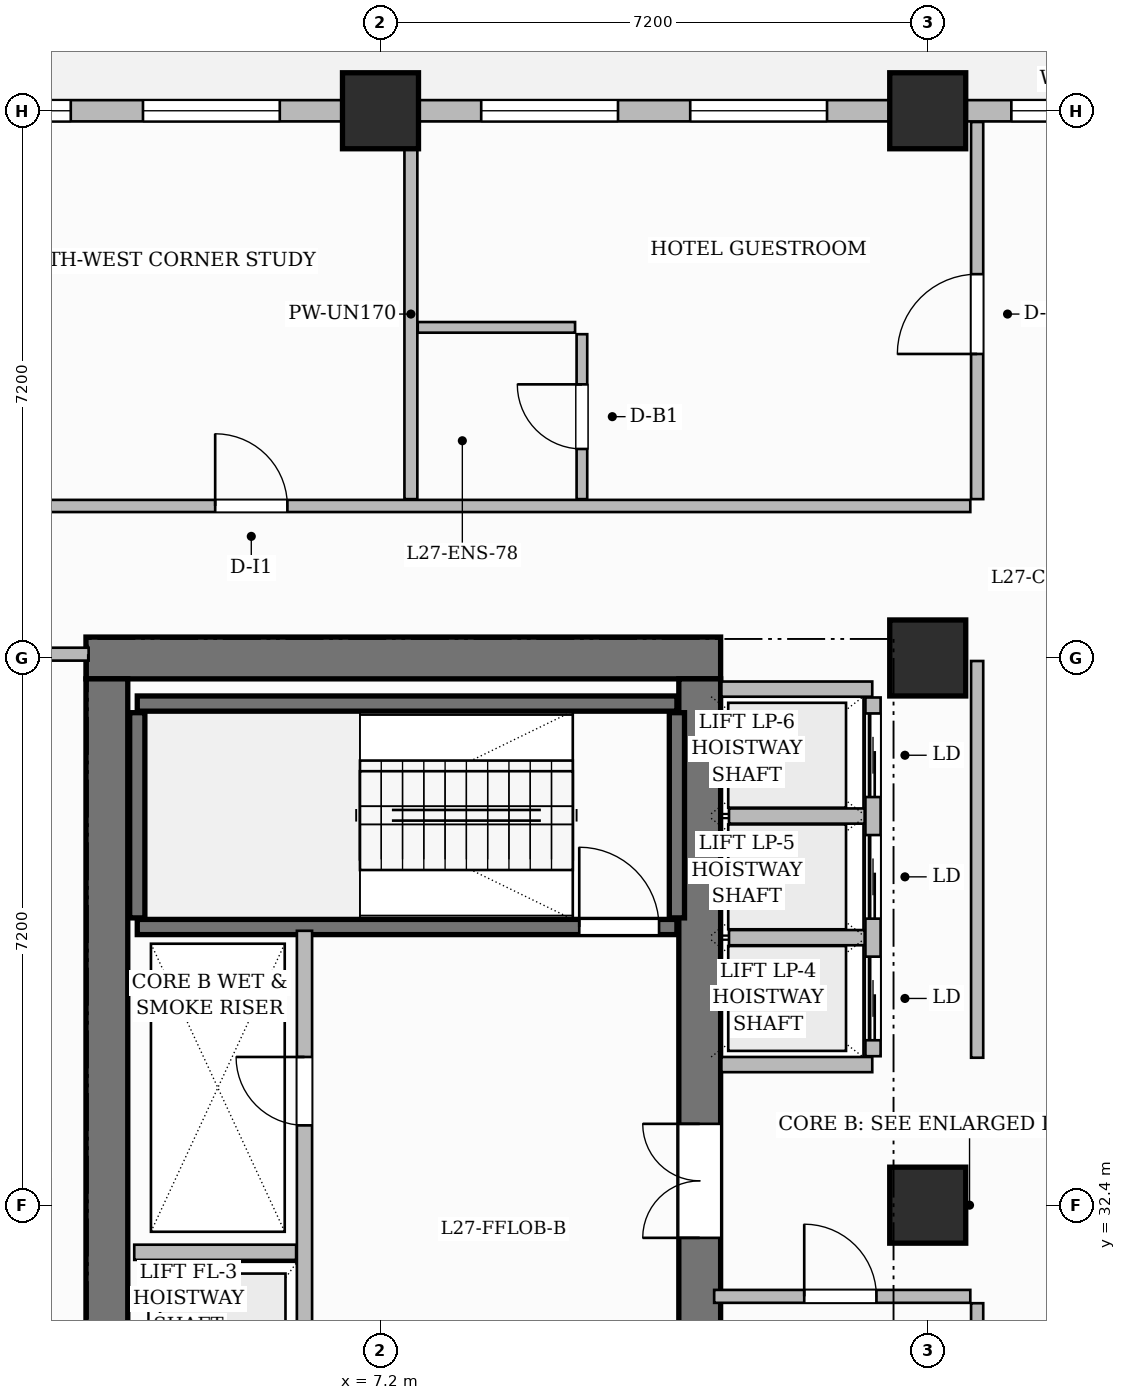
"""IFC4 building model, lengths in metres.
Left out: names, types, materials, properties, quantities, classifications, styles, units other than length and angle.
Written with IfcOpenShell. Run it as: python <this file> out.ifc"""

import sys

from ifc_helpers import new_model, si_unit, direction, frame, frame_2d, origin, origin_2d, place, context, subcontext, project, spatial, rectangle, extrude, source, transform, mapped, element, fill, save


model = new_model("IFC4")
c1 = context("Model", 3, precision=1e-05, world=origin(), true_north=direction((0.0, 1.0)))
c2 = subcontext(c1, "Body", "Model", "MODEL_VIEW")
j1 = project(units=[si_unit("LENGTHUNIT", "METRE"), si_unit("PLANEANGLEUNIT", "RADIAN")], contexts=[c1])
p1 = place(None, origin())
s1 = spatial("IfcSite", under=j1, at=p1, CompositionType="ELEMENT")
p2 = place(p1, origin())
s2 = spatial("IfcBuilding", under=s1, at=p2, CompositionType="ELEMENT")
p3 = place(p2, frame((0.0, 0.0, 111.8)))
s3 = spatial("IfcBuildingStorey", under=s2, at=p3, CompositionType="ELEMENT", Elevation=111.8)
p4 = place(p3, frame((3.325, 39.6, 0.0), z_axis=(0.0, 0.0, 1.0), x_axis=(1.0, 0.0, 0.0)))
e1 = element("IfcWall", 1, at=p4, inside=s3, PredefinedType="SHEAR", context=c2, shape_type="SweptSolid", body=[
    extrude(rectangle(XDim=8.35, YDim=0.55, at=frame_2d((4.175, 0.0))), origin(), (0.0, 0.0, 1.0), 3.7),
])
p5 = place(p3, frame((3.6, 25.475, 0.0), z_axis=(0.0, 0.0, 1.0), x_axis=(0.0, 1.0, 0.0)))
e2 = element("IfcWall", 2, at=p5, inside=s3, PredefinedType="SHEAR", context=c2, shape_type="SweptSolid", body=[
    extrude(rectangle(XDim=13.85, YDim=0.55, at=frame_2d((6.925, 0.0))), origin(), (0.0, 0.0, 1.0), 3.7),
])
p6 = place(p3, frame((11.4, 25.475, 0.0), z_axis=(0.0, 0.0, 1.0), x_axis=(0.0, 1.0, 0.0)))
e3 = element("IfcWall", 3, at=p6, inside=s3, PredefinedType="SHEAR", context=c2, shape_type="SweptSolid", body=[
    extrude(rectangle(XDim=13.85, YDim=0.55, at=frame_2d((6.925, 0.0))), origin(), (0.0, 0.0, 1.0), 3.7),
])
p7 = place(p6, frame((6.495, 0.0, 0.0)))
e4 = element("IfcOpeningElement", 4, at=p7, cuts=e3, PredefinedType="OPENING", context=c2, shape_type="SweptSolid", body=[
    extrude(rectangle(XDim=1.5, YDim=2.2, at=frame_2d((0.75, 1.1))), frame((0.0, 0.285, 0.0), z_axis=(0.0, -1.0, 0.0), x_axis=(1.0, 0.0, 0.0)), (0.0, 0.0, 1.0), 0.57),
])
m1 = source(origin(), c2, "Body", "SweptSolid", [
    extrude(rectangle(XDim=1.0, YDim=1.0, at=origin_2d()), origin(), (0.0, 0.0, 1.0), 3.7),
])
for number, where, z_axis, x_axis in (
    (5, (7.2, 46.8, 0.0), (0.0, 0.0, 1.0), (1.0, 0.0, 0.0)),
    (6, (14.4, 32.4, 0.0), (0.0, 0.0, 1.0), (1.0, 0.0, 0.0)),
    (7, (14.4, 39.6, 0.0), (0.0, 0.0, 1.0), (1.0, 0.0, 0.0)),
    (8, (14.4, 46.8, 0.0), (0.0, 0.0, 1.0), (1.0, 0.0, 0.0)),
):
    element("IfcColumn", number, at=place(p3, frame(where, z_axis=z_axis, x_axis=x_axis)), inside=s3, PredefinedType="COLUMN", context=c2, shape_type="MappedRepresentation", body=[
        mapped(m1, transform((0.0, 0.0, 0.0), scale=1.0)),
    ])
p8 = place(p3, frame((4.0, 39.0, 0.0), z_axis=(0.0, 0.0, 1.0), x_axis=(1.0, 0.0, 0.0)))
e9 = element("IfcWall", 9, at=p8, inside=s3, PredefinedType="SHEAR", context=c2, shape_type="SweptSolid", body=[
    extrude(rectangle(XDim=7.1, YDim=0.2, at=frame_2d((3.55, 0.0))), origin(), (0.0, 0.0, 1.0), 3.7),
])
for number, where, z_axis, x_axis in (
    (10, (4.0, 36.18, 0.0), (0.0, 0.0, 1.0), (0.0, 1.0, 0.0)),
    (11, (11.1, 36.18, 0.0), (0.0, 0.0, 1.0), (0.0, 1.0, 0.0)),
):
    element("IfcWall", number, at=place(p3, frame(where, z_axis=z_axis, x_axis=x_axis)), inside=s3, PredefinedType="SHEAR", context=c2, shape_type="SweptSolid", body=[
        extrude(rectangle(XDim=2.7, YDim=0.2, at=frame_2d((1.35, 0.0))), origin(), (0.0, 0.0, 1.0), 3.7),
    ])
p9 = place(p3, frame((4.0, 36.06, 0.0), z_axis=(0.0, 0.0, 1.0), x_axis=(1.0, 0.0, 0.0)))
e12 = element("IfcWall", 12, at=p9, inside=s3, PredefinedType="SHEAR", context=c2, shape_type="SweptSolid", body=[
    extrude(rectangle(XDim=7.1, YDim=0.2, at=frame_2d((3.55, 0.0))), origin(), (0.0, 0.0, 1.0), 3.7),
])
p10 = place(p9, frame((5.815, 0.0, 0.0)))
e13 = element("IfcOpeningElement", 13, at=p10, cuts=e12, PredefinedType="OPENING", context=c2, shape_type="SweptSolid", body=[
    extrude(rectangle(XDim=1.05, YDim=2.2, at=frame_2d((0.525, 1.1))), frame((0.0, 0.11, 0.0), z_axis=(0.0, -1.0, 0.0), x_axis=(1.0, 0.0, 0.0)), (0.0, 0.0, 1.0), 0.22),
])
p11 = place(p3, frame((6.2, 28.79, 0.0), z_axis=(0.0, 0.0, 1.0), x_axis=(0.0, 1.0, 0.0)))
e14 = element("IfcWall", 14, at=p11, inside=s3, PredefinedType="PARTITIONING", context=c2, shape_type="SweptSolid", body=[
    extrude(rectangle(XDim=7.22, YDim=0.2, at=frame_2d((3.61, 0.0))), origin(), (0.0, 0.0, 1.0), 3.45),
])
p12 = place(p11, frame((4.66, 0.0, 0.0)))
e15 = element("IfcOpeningElement", 15, at=p12, cuts=e14, PredefinedType="OPENING", context=c2, shape_type="SweptSolid", body=[
    extrude(rectangle(XDim=0.9, YDim=2.1, at=frame_2d((0.45, 1.05))), frame((0.0, 0.11, 0.0), z_axis=(0.0, -1.0, 0.0), x_axis=(1.0, 0.0, 0.0)), (0.0, 0.0, 1.0), 0.22),
])
p13 = place(p11, frame((0.96, 0.0, 0.0)))
e16 = element("IfcOpeningElement", 16, at=p13, cuts=e14, PredefinedType="OPENING", context=c2, shape_type="SweptSolid", body=[
    extrude(rectangle(XDim=1.1, YDim=2.2, at=frame_2d((0.55, 1.1))), frame((0.0, 0.11, 0.0), z_axis=(0.0, -1.0, 0.0), x_axis=(1.0, 0.0, 0.0)), (0.0, 0.0, 1.0), 0.22),
])
p14 = place(p3, frame((3.96, 31.78, 0.0), z_axis=(0.0, 0.0, 1.0), x_axis=(1.0, 0.0, 0.0)))
e17 = element("IfcWall", 17, at=p14, inside=s3, PredefinedType="PARTITIONING", context=c2, shape_type="SweptSolid", body=[
    extrude(rectangle(XDim=2.13, YDim=0.2, at=frame_2d((1.065, 0.0))), origin(), (0.0, 0.0, 1.0), 3.45),
])
for number, where, z_axis, x_axis in (
    (18, (11.685, 34.25, 0.0), (0.0, 0.0, 1.0), (1.0, 0.0, 0.0)),
    (19, (11.685, 39.19, 0.0), (0.0, 0.0, 1.0), (1.0, 0.0, 0.0)),
):
    element("IfcWall", number, at=place(p3, frame(where, z_axis=z_axis, x_axis=x_axis)), inside=s3, PredefinedType="PARTITIONING", context=c2, shape_type="SweptSolid", body=[
        extrude(rectangle(XDim=1.985, YDim=0.2, at=frame_2d((0.992, 0.0))), origin(), (0.0, 0.0, 1.0), 3.45),
    ])
p15 = place(p3, frame((13.68, 34.36, 0.0), z_axis=(0.0, 0.0, 1.0), x_axis=(0.0, 1.0, 0.0)))
e20 = element("IfcWall", 20, at=p15, inside=s3, PredefinedType="PARTITIONING", context=c2, shape_type="SweptSolid", body=[
    extrude(rectangle(XDim=4.72, YDim=0.2, at=frame_2d((2.36, 0.0))), origin(), (0.0, 0.0, 1.0), 3.45),
])
p16 = place(p15, frame((0.21, 0.0, 0.0)))
e21 = element("IfcOpeningElement", 21, at=p16, cuts=e20, PredefinedType="OPENING", context=c2, shape_type="SweptSolid", body=[
    extrude(rectangle(XDim=1.1, YDim=2.2, at=frame_2d((0.55, 1.1))), frame((0.0, 0.11, 0.0), z_axis=(0.0, -1.0, 0.0), x_axis=(1.0, 0.0, 0.0)), (0.0, 0.0, 1.0), 0.22),
])
p17 = place(p15, frame((1.81, 0.0, 0.0)))
e22 = element("IfcOpeningElement", 22, at=p17, cuts=e20, PredefinedType="OPENING", context=c2, shape_type="SweptSolid", body=[
    extrude(rectangle(XDim=1.1, YDim=2.2, at=frame_2d((0.55, 1.1))), frame((0.0, 0.11, 0.0), z_axis=(0.0, -1.0, 0.0), x_axis=(1.0, 0.0, 0.0)), (0.0, 0.0, 1.0), 0.22),
])
p18 = place(p15, frame((3.41, 0.0, 0.0)))
e23 = element("IfcOpeningElement", 23, at=p18, cuts=e20, PredefinedType="OPENING", context=c2, shape_type="SweptSolid", body=[
    extrude(rectangle(XDim=1.1, YDim=2.2, at=frame_2d((0.55, 1.1))), frame((0.0, 0.11, 0.0), z_axis=(0.0, -1.0, 0.0), x_axis=(1.0, 0.0, 0.0)), (0.0, 0.0, 1.0), 0.22),
])
for number, where, z_axis, x_axis in (
    (24, (11.785, 35.92, 0.0), (0.0, 0.0, 1.0), (1.0, 0.0, 0.0)),
    (25, (11.785, 37.52, 0.0), (0.0, 0.0, 1.0), (1.0, 0.0, 0.0)),
):
    element("IfcWall", number, at=place(p3, frame(where, z_axis=z_axis, x_axis=x_axis)), inside=s3, PredefinedType="PARTITIONING", context=c2, shape_type="SweptSolid", body=[
        extrude(rectangle(XDim=1.785, YDim=0.2, at=frame_2d((0.893, 0.0))), origin(), (0.0, 0.0, 1.0), 3.45),
    ])
p19 = place(p3, frame((0.24, 39.65, 0.0), z_axis=(0.0, 0.0, 1.0), x_axis=(1.0, 0.0, 0.0)))
e26 = element("IfcWall", 26, at=p19, inside=s3, PredefinedType="PARTITIONING", context=c2, shape_type="SweptSolid", body=[
    extrude(rectangle(XDim=3.12, YDim=0.17, at=frame_2d((1.56, 0.0))), origin(), (0.0, 0.0, 1.0), 3.45),
])
p20 = place(p19, frame((1.11, 0.0, 0.0)))
e27 = element("IfcOpeningElement", 27, at=p20, cuts=e26, PredefinedType="OPENING", context=c2, shape_type="SweptSolid", body=[
    extrude(rectangle(XDim=0.9, YDim=2.15, at=frame_2d((0.45, 1.075))), frame((0.0, 0.095, 0.0), z_axis=(0.0, -1.0, 0.0), x_axis=(1.0, 0.0, 0.0)), (0.0, 0.0, 1.0), 0.19),
])
p21 = place(p3, frame((15.05, 34.34, 0.0), z_axis=(0.0, 0.0, 1.0), x_axis=(0.0, 1.0, 0.0)))
e28 = element("IfcWall", 28, at=p21, inside=s3, PredefinedType="PARTITIONING", context=c2, shape_type="SweptSolid", body=[
    extrude(rectangle(XDim=5.22, YDim=0.16, at=frame_2d((2.61, 0.0))), origin(), (0.0, 0.0, 1.0), 3.45),
])
p22 = place(p3, frame((15.05, 41.69, 0.0), z_axis=(0.0, 0.0, 1.0), x_axis=(0.0, 1.0, 0.0)))
e29 = element("IfcWall", 29, at=p22, inside=s3, PredefinedType="PARTITIONING", context=c2, shape_type="SweptSolid", body=[
    extrude(rectangle(XDim=4.962, YDim=0.16, at=frame_2d((2.481, 0.0))), origin(), (0.0, 0.0, 1.0), 3.45),
])
p23 = place(p22, frame((1.91, 0.0, 0.0)))
e30 = element("IfcOpeningElement", 30, at=p23, cuts=e29, PredefinedType="OPENING", context=c2, shape_type="SweptSolid", body=[
    extrude(rectangle(XDim=1.05, YDim=2.25, at=frame_2d((0.525, 1.125))), frame((0.0, 0.09, 0.0), z_axis=(0.0, -1.0, 0.0), x_axis=(1.0, 0.0, 0.0)), (0.0, 0.0, 1.0), 0.18),
])
p24 = place(p3, frame((7.6, 41.69, 0.0), z_axis=(0.0, 0.0, 1.0), x_axis=(0.0, 1.0, 0.0)))
e31 = element("IfcWall", 31, at=p24, inside=s3, PredefinedType="PARTITIONING", context=c2, shape_type="SweptSolid", body=[
    extrude(rectangle(XDim=4.87, YDim=0.17, at=frame_2d((2.435, 0.0))), origin(), (0.0, 0.0, 1.0), 3.45),
])
p25 = place(p3, frame((0.148, 41.6, 0.0), z_axis=(0.0, 0.0, 1.0), x_axis=(1.0, 0.0, 0.0)))
e32 = element("IfcWall", 32, at=p25, inside=s3, PredefinedType="PARTITIONING", context=c2, shape_type="SweptSolid", body=[
    extrude(rectangle(XDim=14.812, YDim=0.16, at=frame_2d((7.406, 0.0))), origin(), (0.0, 0.0, 1.0), 2.935),
])
p26 = place(p25, frame((4.877, 0.0, 0.0)))
e33 = element("IfcOpeningElement", 33, at=p26, cuts=e32, PredefinedType="OPENING", context=c2, shape_type="SweptSolid", body=[
    extrude(rectangle(XDim=0.95, YDim=2.15, at=frame_2d((0.475, 1.075))), frame((0.0, 0.09, 0.0), z_axis=(0.0, -1.0, 0.0), x_axis=(1.0, 0.0, 0.0)), (0.0, 0.0, 1.0), 0.18),
])
p27 = place(p3, frame((7.69, 43.95, 0.0), z_axis=(0.0, 0.0, 1.0), x_axis=(1.0, 0.0, 0.0)))
e34 = element("IfcWall", 34, at=p27, inside=s3, PredefinedType="PARTITIONING", context=c2, shape_type="SweptSolid", body=[
    extrude(rectangle(XDim=2.07, YDim=0.14, at=frame_2d((1.035, 0.0))), origin(), (0.0, 0.0, 1.0), 2.935),
])
p28 = place(p3, frame((9.85, 41.69, 0.0), z_axis=(0.0, 0.0, 1.0), x_axis=(0.0, 1.0, 0.0)))
e35 = element("IfcWall", 35, at=p28, inside=s3, PredefinedType="PARTITIONING", context=c2, shape_type="SweptSolid", body=[
    extrude(rectangle(XDim=2.17, YDim=0.14, at=frame_2d((1.085, 0.0))), origin(), (0.0, 0.0, 1.0), 3.45),
])
p29 = place(p28, frame((0.66, 0.0, 0.0)))
e36 = element("IfcOpeningElement", 36, at=p29, cuts=e35, PredefinedType="OPENING", context=c2, shape_type="SweptSolid", body=[
    extrude(rectangle(XDim=0.85, YDim=2.1, at=frame_2d((0.425, 1.05))), frame((0.0, 0.08, 0.0), z_axis=(0.0, -1.0, 0.0), x_axis=(1.0, 0.0, 0.0)), (0.0, 0.0, 1.0), 0.16),
])
p30 = place(p3, frame((15.05, 25.39, 0.0), z_axis=(0.0, 0.0, 1.0), x_axis=(0.0, 1.0, 0.0)))
e37 = element("IfcWall", 37, at=p30, inside=s3, PredefinedType="PARTITIONING", context=c2, shape_type="SweptSolid", body=[
    extrude(rectangle(XDim=5.72, YDim=0.16, at=frame_2d((2.86, 0.0))), origin(), (0.0, 0.0, 1.0), 3.45),
])
p31 = place(p3, frame((11.59, 31.2, 0.0), z_axis=(0.0, 0.0, 1.0), x_axis=(1.0, 0.0, 0.0)))
e38 = element("IfcWall", 38, at=p31, inside=s3, PredefinedType="PARTITIONING", context=c2, shape_type="SweptSolid", body=[
    extrude(rectangle(XDim=3.37, YDim=0.17, at=frame_2d((1.685, 0.0))), origin(), (0.0, 0.0, 1.0), 3.45),
])
p32 = place(p31, frame((1.185, 0.0, 0.0)))
e39 = element("IfcOpeningElement", 39, at=p32, cuts=e38, PredefinedType="OPENING", context=c2, shape_type="SweptSolid", body=[
    extrude(rectangle(XDim=0.95, YDim=2.15, at=frame_2d((0.475, 1.075))), frame((0.0, 0.095, 0.0), z_axis=(0.0, -1.0, 0.0), x_axis=(1.0, 0.0, 0.0)), (0.0, 0.0, 1.0), 0.19),
])
p33 = place(p3, frame((0.0, 46.8, 0.0), z_axis=(0.0, 0.0, 1.0), x_axis=(1.0, 0.0, 0.0)))
e40 = element("IfcWall", 40, at=p33, inside=s3, PredefinedType="SOLIDWALL", context=c2, shape_type="SweptSolid", body=[
    extrude(rectangle(XDim=18.0, YDim=0.28, at=frame_2d((9.0, 0.0))), origin(), (0.0, 0.0, 1.0), 2.935),
])
p34 = place(p33, frame((1.325, 0.0, 0.8)))
e41 = element("IfcOpeningElement", 41, at=p34, cuts=e40, PredefinedType="OPENING", context=c2, shape_type="SweptSolid", body=[
    extrude(rectangle(XDim=1.8, YDim=1.85, at=frame_2d((0.9, 0.925))), frame((0.0, 0.15, 0.0), z_axis=(0.0, -1.0, 0.0), x_axis=(1.0, 0.0, 0.0)), (0.0, 0.0, 1.0), 0.3),
])
p35 = place(p33, frame((4.075, 0.0, 0.8)))
e42 = element("IfcOpeningElement", 42, at=p35, cuts=e40, PredefinedType="OPENING", context=c2, shape_type="SweptSolid", body=[
    extrude(rectangle(XDim=1.8, YDim=1.85, at=frame_2d((0.9, 0.925))), frame((0.0, 0.15, 0.0), z_axis=(0.0, -1.0, 0.0), x_axis=(1.0, 0.0, 0.0)), (0.0, 0.0, 1.0), 0.3),
])
p36 = place(p33, frame((8.525, 0.0, 0.8)))
e43 = element("IfcOpeningElement", 43, at=p36, cuts=e40, PredefinedType="OPENING", context=c2, shape_type="SweptSolid", body=[
    extrude(rectangle(XDim=1.8, YDim=1.85, at=frame_2d((0.9, 0.925))), frame((0.0, 0.15, 0.0), z_axis=(0.0, -1.0, 0.0), x_axis=(1.0, 0.0, 0.0)), (0.0, 0.0, 1.0), 0.3),
])
p37 = place(p33, frame((11.275, 0.0, 0.8)))
e44 = element("IfcOpeningElement", 44, at=p37, cuts=e40, PredefinedType="OPENING", context=c2, shape_type="SweptSolid", body=[
    extrude(rectangle(XDim=1.8, YDim=1.85, at=frame_2d((0.9, 0.925))), frame((0.0, 0.15, 0.0), z_axis=(0.0, -1.0, 0.0), x_axis=(1.0, 0.0, 0.0)), (0.0, 0.0, 1.0), 0.3),
])
p38 = place(p33, frame((15.5, 0.0, 0.8)))
e45 = element("IfcOpeningElement", 45, at=p38, cuts=e40, PredefinedType="OPENING", context=c2, shape_type="SweptSolid", body=[
    extrude(rectangle(XDim=1.4, YDim=1.85, at=frame_2d((0.7, 0.925))), frame((0.0, 0.15, 0.0), z_axis=(0.0, -1.0, 0.0), x_axis=(1.0, 0.0, 0.0)), (0.0, 0.0, 1.0), 0.3),
])
m2 = source(origin(), c2, "Body", "SweptSolid", [
    extrude(rectangle(XDim=1.05, YDim=2.2, at=frame_2d((0.525, 1.1))), frame((0.0, 0.025, 0.0), z_axis=(0.0, -1.0, 0.0), x_axis=(1.0, 0.0, 0.0)), (0.0, 0.0, 1.0), 0.05),
])
p39 = place(p10, origin())
e46 = element("IfcDoor", 46, at=p39, inside=s3, OperationType="SINGLE_SWING_LEFT", PredefinedType="DOOR", context=c2, shape_type="MappedRepresentation", body=[
    mapped(m2, transform((0.0, 0.0, 0.0), scale=1.0)),
])
fill(e13, e46)
m3 = source(origin(), c2, "Body", "SweptSolid", [
    extrude(rectangle(XDim=0.9, YDim=2.1, at=frame_2d((0.45, 1.05))), frame((0.0, 0.025, 0.0), z_axis=(0.0, -1.0, 0.0), x_axis=(1.0, 0.0, 0.0)), (0.0, 0.0, 1.0), 0.05),
])
p40 = place(p12, origin())
e47 = element("IfcDoor", 47, at=p40, inside=s3, OperationType="SINGLE_SWING_RIGHT", PredefinedType="DOOR", context=c2, shape_type="MappedRepresentation", body=[
    mapped(m3, transform((0.0, 0.0, 0.0), scale=1.0)),
])
fill(e15, e47)
m4 = source(origin(), c2, "Body", "SweptSolid", [
    extrude(rectangle(XDim=1.5, YDim=2.2, at=frame_2d((0.75, 1.1))), frame((0.0, 0.025, 0.0), z_axis=(0.0, -1.0, 0.0), x_axis=(1.0, 0.0, 0.0)), (0.0, 0.0, 1.0), 0.05),
])
p41 = place(p7, origin())
e48 = element("IfcDoor", 48, at=p41, inside=s3, OperationType="DOUBLE_DOOR_SINGLE_SWING", PredefinedType="DOOR", context=c2, shape_type="MappedRepresentation", body=[
    mapped(m4, transform((0.0, 0.0, 0.0), scale=1.0)),
])
fill(e4, e48)
m5 = source(origin(), c2, "Body", "SweptSolid", [
    extrude(rectangle(XDim=0.95, YDim=2.15, at=frame_2d((0.475, 1.075))), frame((0.0, 0.025, 0.0), z_axis=(0.0, -1.0, 0.0), x_axis=(1.0, 0.0, 0.0)), (0.0, 0.0, 1.0), 0.05),
])
p42 = place(p26, origin())
e49 = element("IfcDoor", 49, at=p42, inside=s3, OperationType="SINGLE_SWING_LEFT", PredefinedType="DOOR", context=c2, shape_type="MappedRepresentation", body=[
    mapped(m5, transform((0.0, 0.0, 0.0), scale=1.0)),
])
fill(e33, e49)
m6 = source(origin(), c2, "Body", "SweptSolid", [
    extrude(rectangle(XDim=0.85, YDim=2.1, at=frame_2d((0.425, 1.05))), frame((0.0, 0.025, 0.0), z_axis=(0.0, -1.0, 0.0), x_axis=(1.0, 0.0, 0.0)), (0.0, 0.0, 1.0), 0.05),
])
p43 = place(p29, origin())
e50 = element("IfcDoor", 50, at=p43, inside=s3, OperationType="SINGLE_SWING_RIGHT", PredefinedType="DOOR", context=c2, shape_type="MappedRepresentation", body=[
    mapped(m6, transform((0.0, 0.0, 0.0), scale=1.0)),
])
fill(e36, e50)
m7 = source(origin(), c2, "Body", "SweptSolid", [
    extrude(rectangle(XDim=1.05, YDim=2.25, at=frame_2d((0.525, 1.125))), frame((0.0, 0.025, 0.0), z_axis=(0.0, -1.0, 0.0), x_axis=(1.0, 0.0, 0.0)), (0.0, 0.0, 1.0), 0.05),
])
p44 = place(p23, origin())
e51 = element("IfcDoor", 51, at=p44, inside=s3, OperationType="SINGLE_SWING_LEFT", PredefinedType="DOOR", context=c2, shape_type="MappedRepresentation", body=[
    mapped(m7, transform((0.0, 0.0, 0.0), scale=1.0)),
])
fill(e30, e51)
p45 = place(p32, origin())
e52 = element("IfcDoor", 52, at=p45, inside=s3, OperationType="SINGLE_SWING_LEFT", PredefinedType="DOOR", context=c2, shape_type="MappedRepresentation", body=[
    mapped(m5, transform((0.0, 0.0, 0.0), scale=1.0)),
])
fill(e39, e52)
m8 = source(origin(), c2, "Body", "SweptSolid", [
    extrude(rectangle(XDim=1.1, YDim=2.2, at=frame_2d((0.55, 1.1))), frame((0.0, 0.025, 0.0), z_axis=(0.0, -1.0, 0.0), x_axis=(1.0, 0.0, 0.0)), (0.0, 0.0, 1.0), 0.05),
])
p46 = place(p16, origin())
e53 = element("IfcDoor", 53, at=p46, inside=s3, OperationType="SLIDING_TO_LEFT", PredefinedType="DOOR", context=c2, shape_type="MappedRepresentation", body=[
    mapped(m8, transform((0.0, 0.0, 0.0), scale=1.0)),
])
fill(e21, e53)
p47 = place(p17, origin())
e54 = element("IfcDoor", 54, at=p47, inside=s3, OperationType="SLIDING_TO_LEFT", PredefinedType="DOOR", context=c2, shape_type="MappedRepresentation", body=[
    mapped(m8, transform((0.0, 0.0, 0.0), scale=1.0)),
])
fill(e22, e54)
p48 = place(p18, origin())
e55 = element("IfcDoor", 55, at=p48, inside=s3, OperationType="SLIDING_TO_LEFT", PredefinedType="DOOR", context=c2, shape_type="MappedRepresentation", body=[
    mapped(m8, transform((0.0, 0.0, 0.0), scale=1.0)),
])
fill(e23, e55)
m9 = source(origin(), c2, "Body", "SweptSolid", [
    extrude(rectangle(XDim=1.8, YDim=1.85, at=frame_2d((0.9, 0.925))), frame((0.0, 0.03, 0.0), z_axis=(0.0, -1.0, 0.0), x_axis=(1.0, 0.0, 0.0)), (0.0, 0.0, 1.0), 0.06),
])
p49 = place(p34, origin())
e56 = element("IfcWindow", 56, at=p49, inside=s3, PartitioningType="DOUBLE_PANEL_VERTICAL", PredefinedType="WINDOW", context=c2, shape_type="MappedRepresentation", body=[
    mapped(m9, transform((0.0, 0.0, 0.0), scale=1.0)),
])
fill(e41, e56)
p50 = place(p35, origin())
e57 = element("IfcWindow", 57, at=p50, inside=s3, PartitioningType="DOUBLE_PANEL_VERTICAL", PredefinedType="WINDOW", context=c2, shape_type="MappedRepresentation", body=[
    mapped(m9, transform((0.0, 0.0, 0.0), scale=1.0)),
])
fill(e42, e57)
p51 = place(p36, origin())
e58 = element("IfcWindow", 58, at=p51, inside=s3, PartitioningType="DOUBLE_PANEL_VERTICAL", PredefinedType="WINDOW", context=c2, shape_type="MappedRepresentation", body=[
    mapped(m9, transform((0.0, 0.0, 0.0), scale=1.0)),
])
fill(e43, e58)
p52 = place(p37, origin())
e59 = element("IfcWindow", 59, at=p52, inside=s3, PartitioningType="DOUBLE_PANEL_VERTICAL", PredefinedType="WINDOW", context=c2, shape_type="MappedRepresentation", body=[
    mapped(m9, transform((0.0, 0.0, 0.0), scale=1.0)),
])
fill(e44, e59)
m10 = source(origin(), c2, "Body", "SweptSolid", [
    extrude(rectangle(XDim=1.4, YDim=1.85, at=frame_2d((0.7, 0.925))), frame((0.0, 0.03, 0.0), z_axis=(0.0, -1.0, 0.0), x_axis=(1.0, 0.0, 0.0)), (0.0, 0.0, 1.0), 0.06),
])
p53 = place(p38, origin())
e60 = element("IfcWindow", 60, at=p53, inside=s3, PartitioningType="SINGLE_PANEL", PredefinedType="WINDOW", context=c2, shape_type="MappedRepresentation", body=[
    mapped(m10, transform((0.0, 0.0, 0.0), scale=1.0)),
])
fill(e45, e60)
save(model, sys.argv[1])
